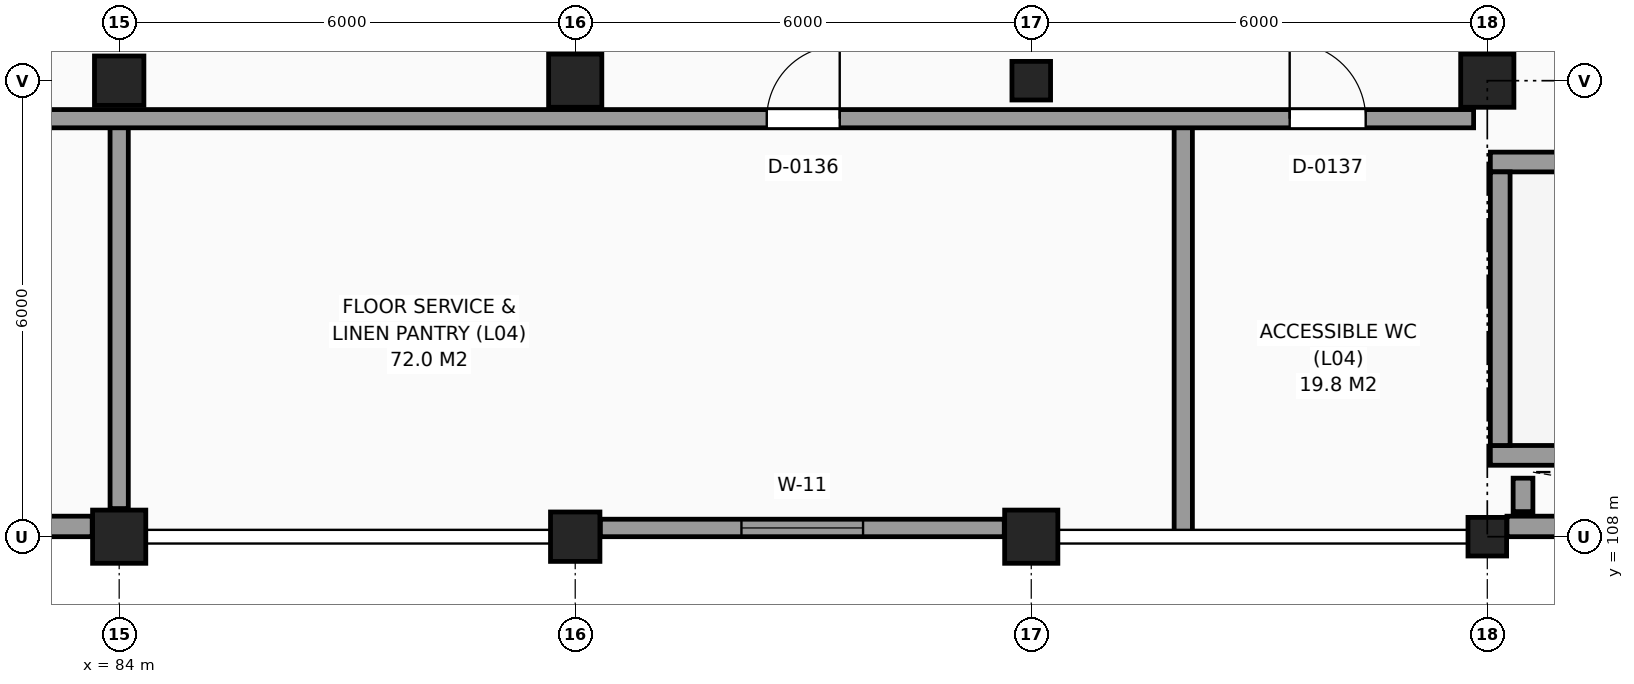
"""IFC4 building model, lengths in metres.
Left out: names, types, materials, properties, quantities, classifications, styles, units other than length and angle.
Written with IfcOpenShell. Run it as: python <this file> out.ifc"""

import sys

from ifc_helpers import new_model, si_unit, direction, frame, frame_2d, origin, origin_2d, place, context, subcontext, project, spatial, rectangle, circle, hollow_circle, extrude, element, fill, save


model = new_model("IFC4")
c1 = context("Model", 3, precision=1e-05, world=origin(), true_north=direction((0.0, 1.0)))
c2 = subcontext(c1, "Body", "Model", "MODEL_VIEW")
j1 = project(units=[si_unit("LENGTHUNIT", "METRE"), si_unit("PLANEANGLEUNIT", "RADIAN")], contexts=[c1])
p1 = place(None, origin())
s1 = spatial("IfcSite", under=j1, at=p1, CompositionType="ELEMENT")
p2 = place(p1, origin())
s2 = spatial("IfcBuilding", under=s1, at=p2, CompositionType="ELEMENT")
p3 = place(p2, frame((0.0, 0.0, 19.8)))
s3 = spatial("IfcBuildingStorey", under=s2, at=p3, CompositionType="ELEMENT", Elevation=19.8)
p4 = place(p3, frame((84.0, 108.0, 0.0), z_axis=(0.0, 0.0, 1.0), x_axis=(1.0, 0.0, 0.0)))
e1 = element("IfcColumn", 1, at=p4, inside=s3, PredefinedType="COLUMN", context=c2, shape_type="SweptSolid", body=[
    extrude(rectangle(XDim=0.7, YDim=0.7, at=origin_2d()), origin(), (0.0, 0.0, 1.0), 4.8),
])
for number, where, z_axis, x_axis in (
    (2, (84.0, 114.0, 0.0), (0.0, 0.0, 1.0), (1.0, 0.0, 0.0)),
    (3, (90.0, 108.0, 0.0), (0.0, 0.0, 1.0), (1.0, 0.0, 0.0)),
):
    element("IfcColumn", number, at=place(p3, frame(where, z_axis=z_axis, x_axis=x_axis)), inside=s3, PredefinedType="COLUMN", context=c2, shape_type="SweptSolid", body=[
        extrude(rectangle(XDim=0.65, YDim=0.65, at=origin_2d()), origin(), (0.0, 0.0, 1.0), 4.8),
    ])
for number, where, z_axis, x_axis in (
    (4, (90.0, 114.0, 0.0), (0.0, 0.0, 1.0), (1.0, 0.0, 0.0)),
    (5, (96.0, 108.0, 0.0), (0.0, 0.0, 1.0), (1.0, 0.0, 0.0)),
):
    element("IfcColumn", number, at=place(p3, frame(where, z_axis=z_axis, x_axis=x_axis)), inside=s3, PredefinedType="COLUMN", context=c2, shape_type="SweptSolid", body=[
        extrude(circle(Radius=0.35, at=origin_2d()), origin(), (0.0, 0.0, 1.0), 4.8),
    ])
for number, where, z_axis, x_axis in (
    (6, (96.0, 114.0, 0.0), (0.0, 0.0, 1.0), (1.0, 0.0, 0.0)),
    (7, (102.0, 108.0, 0.0), (0.0, 0.0, 1.0), (1.0, 0.0, 0.0)),
):
    element("IfcColumn", number, at=place(p3, frame(where, z_axis=z_axis, x_axis=x_axis)), inside=s3, PredefinedType="COLUMN", context=c2, shape_type="SweptSolid", body=[
        extrude(hollow_circle(Radius=0.254, WallThickness=0.025, at=origin_2d()), origin(), (0.0, 0.0, 1.0), 4.8),
    ])
p5 = place(p3, frame((102.0, 114.0, 0.0), z_axis=(0.0, 0.0, 1.0), x_axis=(1.0, 0.0, 0.0)))
e8 = element("IfcColumn", 8, at=p5, inside=s3, PredefinedType="COLUMN", context=c2, shape_type="SweptSolid", body=[
    extrude(rectangle(XDim=0.7, YDim=0.7, at=origin_2d()), origin(), (0.0, 0.0, 1.0), 4.8),
])
p6 = place(p3, frame((78.259, 108.135, 0.0), z_axis=(0.0, 0.0, 1.0), x_axis=(1.0, 0.0, 0.0)))
e9 = element("IfcWall", 9, at=p6, inside=s3, PredefinedType="SOLIDWALL", context=c2, shape_type="SweptSolid", body=[
    extrude(rectangle(XDim=5.386, YDim=0.27, at=frame_2d((2.693, 0.0))), origin(), (0.0, 0.0, 1.0), 3.9),
])
p7 = place(p3, frame((90.33, 108.115, 0.0), z_axis=(0.0, 0.0, 1.0), x_axis=(1.0, 0.0, 0.0)))
e10 = element("IfcWall", 10, at=p7, inside=s3, PredefinedType="SOLIDWALL", context=c2, shape_type="SweptSolid", body=[
    extrude(rectangle(XDim=5.315, YDim=0.23, at=frame_2d((2.657, 0.0))), origin(), (0.0, 0.0, 1.0), 3.9),
])
p8 = place(p7, frame((1.857, 0.0, 0.85)))
e11 = element("IfcOpeningElement", 11, at=p8, cuts=e10, PredefinedType="OPENING", context=c2, shape_type="SweptSolid", body=[
    extrude(rectangle(XDim=1.6, YDim=1.5, at=frame_2d((0.8, 0.75))), frame((0.0, 0.125, 0.0), z_axis=(0.0, -1.0, 0.0), x_axis=(1.0, 0.0, 0.0)), (0.0, 0.0, 1.0), 0.25),
])
p9 = place(p3, frame((102.259, 108.135, 0.0), z_axis=(0.0, 0.0, 1.0), x_axis=(1.0, 0.0, 0.0)))
e12 = element("IfcWall", 12, at=p9, inside=s3, PredefinedType="SOLIDWALL", context=c2, shape_type="SweptSolid", body=[
    extrude(rectangle(XDim=5.386, YDim=0.27, at=frame_2d((2.693, 0.0))), origin(), (0.0, 0.0, 1.0), 4.55),
])
for number, where, z_axis, x_axis in (
    (13, (102.04, 109.07, 0.0), (0.0, 0.0, 1.0), (1.0, 0.0, 0.0)),
    (14, (102.04, 112.93, 0.0), (0.0, 0.0, 1.0), (1.0, 0.0, 0.0)),
):
    element("IfcWall", number, at=place(p3, frame(where, z_axis=z_axis, x_axis=x_axis)), inside=s3, PredefinedType="SHEAR", context=c2, shape_type="SweptSolid", body=[
        extrude(rectangle(XDim=10.72, YDim=0.26, at=frame_2d((5.36, 0.0))), origin(), (0.0, 0.0, 1.0), 4.8),
    ])
p10 = place(p3, frame((102.17, 109.2, 0.0), z_axis=(0.0, 0.0, 1.0), x_axis=(0.0, 1.0, 0.0)))
e15 = element("IfcWall", 15, at=p10, inside=s3, PredefinedType="SHEAR", context=c2, shape_type="SweptSolid", body=[
    extrude(rectangle(XDim=3.6, YDim=0.26, at=frame_2d((1.8, 0.0))), origin(), (0.0, 0.0, 1.0), 4.8),
])
p11 = place(p3, frame((102.47, 108.33, 0.0), z_axis=(0.0, 0.0, 1.0), x_axis=(0.0, 1.0, 0.0)))
e16 = element("IfcWall", 16, at=p11, inside=s3, PredefinedType="SHEAR", context=c2, shape_type="SweptSolid", body=[
    extrude(rectangle(XDim=0.44, YDim=0.26, at=frame_2d((0.22, 0.0))), origin(), (0.0, 0.0, 1.0), 4.8),
])
p12 = place(p3, frame((84.0, 108.37, 0.0), z_axis=(0.0, 0.0, 1.0), x_axis=(0.0, 1.0, 0.0)))
e17 = element("IfcWall", 17, at=p12, inside=s3, PredefinedType="PARTITIONING", context=c2, shape_type="SweptSolid", body=[
    extrude(rectangle(XDim=5.13, YDim=0.24, at=frame_2d((2.565, 0.0))), origin(), (0.0, 0.0, 1.0), 3.75),
])
p13 = place(p3, frame((98.0, 108.045, 0.0), z_axis=(0.0, 0.0, 1.0), x_axis=(0.0, 1.0, 0.0)))
e18 = element("IfcWall", 18, at=p13, inside=s3, PredefinedType="PARTITIONING", context=c2, shape_type="SweptSolid", body=[
    extrude(rectangle(XDim=5.455, YDim=0.24, at=frame_2d((2.728, 0.0))), origin(), (0.0, 0.0, 1.0), 4.55),
])
p14 = place(p3, frame((76.75, 113.5, 0.0), z_axis=(0.0, 0.0, 1.0), x_axis=(1.0, 0.0, 0.0)))
e19 = element("IfcWall", 19, at=p14, inside=s3, PredefinedType="PARTITIONING", context=c2, shape_type="SweptSolid", body=[
    extrude(rectangle(XDim=25.07, YDim=0.24, at=frame_2d((12.535, 0.0))), origin(), (0.0, 0.0, 1.0), 4.55),
])
p15 = place(p14, frame((15.77, 0.0, 0.0)))
e20 = element("IfcOpeningElement", 20, at=p15, cuts=e19, PredefinedType="OPENING", context=c2, shape_type="SweptSolid", body=[
    extrude(rectangle(XDim=0.96, YDim=2.15, at=frame_2d((0.48, 1.075))), frame((0.0, 0.13, 0.0), z_axis=(0.0, -1.0, 0.0), x_axis=(1.0, 0.0, 0.0)), (0.0, 0.0, 1.0), 0.26),
])
p16 = place(p14, frame((22.65, 0.0, 0.0)))
e21 = element("IfcOpeningElement", 21, at=p16, cuts=e19, PredefinedType="OPENING", context=c2, shape_type="SweptSolid", body=[
    extrude(rectangle(XDim=1.0, YDim=2.15, at=frame_2d((0.5, 1.075))), frame((0.0, 0.13, 0.0), z_axis=(0.0, -1.0, 0.0), x_axis=(1.0, 0.0, 0.0)), (0.0, 0.0, 1.0), 0.26),
])
p17 = place(p14, frame((3.25, 0.0, 0.0)))
e22 = element("IfcOpeningElement", 22, at=p17, cuts=e19, PredefinedType="OPENING", context=c2, shape_type="SweptSolid", body=[
    extrude(rectangle(XDim=1.1, YDim=2.15, at=frame_2d((0.55, 1.075))), frame((0.0, 0.13, 0.0), z_axis=(0.0, -1.0, 0.0), x_axis=(1.0, 0.0, 0.0)), (0.0, 0.0, 1.0), 0.26),
])
p18 = place(p8, origin())
e23 = element("IfcWindow", 23, at=p18, inside=s3, PartitioningType="SINGLE_PANEL", PredefinedType="WINDOW", context=c2, shape_type="SweptSolid", body=[
    extrude(rectangle(XDim=1.6, YDim=1.5, at=frame_2d((0.8, 0.75))), frame((0.0, 0.03, 0.0), z_axis=(0.0, -1.0, 0.0), x_axis=(1.0, 0.0, 0.0)), (0.0, 0.0, 1.0), 0.06),
])
fill(e11, e23)
p19 = place(p15, origin())
e24 = element("IfcDoor", 24, at=p19, inside=s3, OperationType="SINGLE_SWING_RIGHT", PredefinedType="DOOR", context=c2, shape_type="SweptSolid", body=[
    extrude(rectangle(XDim=0.96, YDim=2.15, at=frame_2d((0.48, 1.075))), frame((0.0, 0.025, 0.0), z_axis=(0.0, -1.0, 0.0), x_axis=(1.0, 0.0, 0.0)), (0.0, 0.0, 1.0), 0.05),
])
fill(e20, e24)
p20 = place(p16, origin())
e25 = element("IfcDoor", 25, at=p20, inside=s3, OperationType="SINGLE_SWING_LEFT", PredefinedType="DOOR", context=c2, shape_type="SweptSolid", body=[
    extrude(rectangle(XDim=1.0, YDim=2.15, at=frame_2d((0.5, 1.075))), frame((0.0, 0.025, 0.0), z_axis=(0.0, -1.0, 0.0), x_axis=(1.0, 0.0, 0.0)), (0.0, 0.0, 1.0), 0.05),
])
fill(e21, e25)
save(model, sys.argv[1])
